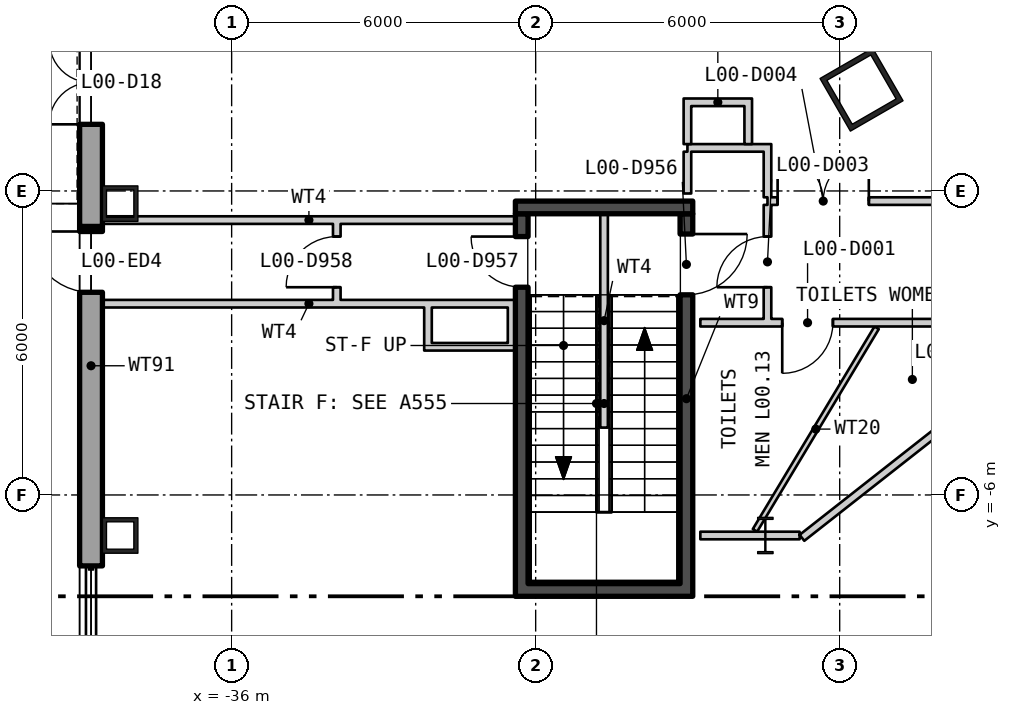
"""IFC4 building model, lengths in metres.
Left out: names, types, materials, properties, quantities, classifications, styles, units other than length and angle.
Written with IfcOpenShell. Run it as: python <this file> out.ifc"""

import sys

from ifc_helpers import new_model, si_unit, direction, frame, frame_2d, origin, origin_2d, place, context, subcontext, project, spatial, polyline, rectangle, hollow_rectangle, i_section, outline, extrude, element, fill, save


model = new_model("IFC4")
c1 = context("Model", 3, precision=1e-05, world=origin(), true_north=direction((0.0, 1.0)))
c2 = subcontext(c1, "Body", "Model", "MODEL_VIEW")
j1 = project(units=[si_unit("LENGTHUNIT", "METRE"), si_unit("PLANEANGLEUNIT", "RADIAN")], contexts=[c1])
p1 = place(None, origin())
s1 = spatial("IfcSite", under=j1, at=p1, CompositionType="ELEMENT")
p2 = place(p1, origin())
s2 = spatial("IfcBuilding", under=s1, at=p2, CompositionType="ELEMENT")
p3 = place(p2, origin())
s3 = spatial("IfcBuildingStorey", under=s2, at=p3, CompositionType="ELEMENT", Elevation=0.0)
p4 = place(p3, frame((-23.569, 2.0, 0.0), z_axis=(0.0, 0.0, 1.0), x_axis=(0.5, -0.866025403784, 0.0)))
e1 = element("IfcColumn", 1, at=p4, inside=s3, PredefinedType="COLUMN", context=c2, shape_type="SweptSolid", body=[
    extrude(hollow_rectangle(XDim=1.2, YDim=1.2, WallThickness=0.1, at=origin_2d()), origin(), (0.0, 0.0, 1.0), 8.4),
])
for number, where, z_axis, x_axis in (
    (2, (-38.2, -0.25, 0.0), (0.0, 0.0, 1.0), (0.0, -1.0, 0.0)),
    (3, (-38.2, -6.8, 0.0), (0.0, 0.0, 1.0), (0.0, -1.0, 0.0)),
):
    element("IfcColumn", number, at=place(p3, frame(where, z_axis=z_axis, x_axis=x_axis)), inside=s3, PredefinedType="COLUMN", context=c2, shape_type="SweptSolid", body=[
        extrude(hollow_rectangle(XDim=0.7, YDim=0.7, WallThickness=0.08, at=origin_2d()), origin(), (0.0, 0.0, 1.0), 8.4),
    ])
p5 = place(p3, frame((-25.467, -6.8, 0.0), z_axis=(0.0, 0.0, 1.0), x_axis=(1.0, 0.0, 0.0)))
e4 = element("IfcColumn", 4, at=p5, inside=s3, PredefinedType="COLUMN", context=c2, shape_type="SweptSolid", body=[
    extrude(i_section(OverallWidth=0.304, OverallDepth=0.716, WebThickness=0.021, FlangeThickness=0.04, at=origin_2d()), origin(), (0.0, 0.0, 1.0), 8.4),
])
p6 = place(p3, frame((-38.775, 19.975, 5.4), z_axis=(0.0, 0.0, 1.0), x_axis=(0.0, -1.0, 0.0)))
e5 = element("IfcWall", 5, at=p6, inside=s3, PredefinedType="SOLIDWALL", context=c2, shape_type="SweptSolid", body=[
    extrude(outline(polyline([(-0.225, -0.225), (53.775, -0.225), (53.325, 0.225), (0.225, 0.225), (-0.225, -0.225)])), origin(), (0.0, 0.0, 1.0), 2.6),
])
p7 = place(p3, frame((-38.775, 0.35, -0.4), z_axis=(0.0, 0.0, 1.0), x_axis=(0.0, -1.0, 0.0)))
e6 = element("IfcWall", 6, at=p7, inside=s3, PredefinedType="SOLIDWALL", context=c2, shape_type="SweptSolid", body=[
    extrude(outline(polyline([(0.0, -0.225), (1.05, -0.225), (1.05, 0.225), (0.0, 0.225), (0.0, -0.225)])), origin(), (0.0, 0.0, 1.0), 5.51),
])
p8 = place(p3, frame((-38.775, -6.2, -0.4), z_axis=(0.0, 0.0, 1.0), x_axis=(0.0, -1.0, 0.0)))
e7 = element("IfcWall", 7, at=p8, inside=s3, PredefinedType="SOLIDWALL", context=c2, shape_type="SweptSolid", body=[
    extrude(outline(polyline([(0.0, -0.225), (1.2, -0.225), (1.2, 0.225), (0.0, 0.225), (0.0, -0.225)])), origin(), (0.0, 0.0, 1.0), 5.8),
])
p9 = place(p3, frame((-38.775, 5.7, -0.4), z_axis=(0.0, 0.0, 1.0), x_axis=(0.0, -1.0, 0.0)))
e8 = element("IfcWall", 8, at=p9, inside=s3, PredefinedType="SOLIDWALL", context=c2, shape_type="SweptSolid", body=[
    extrude(outline(polyline([(0.0, -0.225), (5.35, -0.225), (5.35, 0.225), (0.0, 0.225), (0.0, -0.225)])), origin(), (0.0, 0.0, 1.0), 5.8),
])
p10 = place(p9, frame((0.965, 0.0, 0.4)))
e9 = element("IfcOpeningElement", 9, at=p10, cuts=e8, PredefinedType="OPENING", context=c2, shape_type="SweptSolid", body=[
    extrude(rectangle(XDim=1.65, YDim=3.0, at=frame_2d((0.825, 1.5))), frame((0.0, 0.235, 0.0), z_axis=(0.0, -1.0, 0.0), x_axis=(1.0, 0.0, 0.0)), (0.0, 0.0, 1.0), 0.47),
])
p11 = place(p9, frame((2.735, 0.0, 0.4)))
e10 = element("IfcOpeningElement", 10, at=p11, cuts=e8, PredefinedType="OPENING", context=c2, shape_type="SweptSolid", body=[
    extrude(rectangle(XDim=1.65, YDim=3.0, at=frame_2d((0.825, 1.5))), frame((0.0, 0.235, 0.0), z_axis=(0.0, -1.0, 0.0), x_axis=(1.0, 0.0, 0.0)), (0.0, 0.0, 1.0), 0.47),
])
p12 = place(p3, frame((-38.775, -0.7, -0.4), z_axis=(0.0, 0.0, 1.0), x_axis=(0.0, -1.0, 0.0)))
e11 = element("IfcWall", 11, at=p12, inside=s3, PredefinedType="SOLIDWALL", context=c2, shape_type="SweptSolid", body=[
    extrude(outline(polyline([(0.0, -0.225), (5.5, -0.225), (5.5, 0.225), (0.0, 0.225), (0.0, -0.225)])), origin(), (0.0, 0.0, 1.0), 5.8),
])
p13 = place(p12, frame((0.1, 0.0, 0.4)))
e12 = element("IfcOpeningElement", 12, at=p13, cuts=e11, PredefinedType="OPENING", context=c2, shape_type="SweptSolid", body=[
    extrude(rectangle(XDim=1.2, YDim=2.4, at=frame_2d((0.6, 1.2))), frame((0.0, 0.235, 0.0), z_axis=(0.0, -1.0, 0.0), x_axis=(1.0, 0.0, 0.0)), (0.0, 0.0, 1.0), 0.47),
])
p14 = place(p3, frame((-38.775, -7.4, -0.4), z_axis=(0.0, 0.0, 1.0), x_axis=(0.0, -1.0, 0.0)))
e13 = element("IfcWall", 13, at=p14, inside=s3, PredefinedType="SOLIDWALL", context=c2, shape_type="SweptSolid", body=[
    extrude(outline(polyline([(0.0, -0.225), (5.35, -0.225), (5.35, 0.225), (0.0, 0.225), (0.0, -0.225)])), origin(), (0.0, 0.0, 1.0), 1.0),
])
p15 = place(p3, frame((-30.275, -7.75, 0.0), z_axis=(0.0, 0.0, 1.0), x_axis=(0.0, 1.0, 0.0)))
e14 = element("IfcWall", 14, at=p15, inside=s3, PredefinedType="SHEAR", context=c2, shape_type="SweptSolid", body=[
    extrude(rectangle(XDim=7.3, YDim=0.25, at=frame_2d((3.65, 0.0))), origin(), (0.0, 0.0, 1.0), 8.18),
])
p16 = place(p15, frame((5.85, 0.0, 0.0)))
e15 = element("IfcOpeningElement", 15, at=p16, cuts=e14, PredefinedType="OPENING", context=c2, shape_type="SweptSolid", body=[
    extrude(rectangle(XDim=1.0, YDim=2.1, at=frame_2d((0.5, 1.05))), frame((0.0, 0.135, 0.0), z_axis=(0.0, -1.0, 0.0), x_axis=(1.0, 0.0, 0.0)), (0.0, 0.0, 1.0), 0.27),
])
p17 = place(p3, frame((-27.025, -7.75, 0.0), z_axis=(0.0, 0.0, 1.0), x_axis=(0.0, 1.0, 0.0)))
e16 = element("IfcWall", 16, at=p17, inside=s3, PredefinedType="SHEAR", context=c2, shape_type="SweptSolid", body=[
    extrude(rectangle(XDim=7.3, YDim=0.25, at=frame_2d((3.65, 0.0))), origin(), (0.0, 0.0, 1.0), 8.18),
])
p18 = place(p17, frame((5.7, 0.0, 0.0)))
e17 = element("IfcOpeningElement", 17, at=p18, cuts=e16, PredefinedType="OPENING", context=c2, shape_type="SweptSolid", body=[
    extrude(rectangle(XDim=1.2, YDim=2.1, at=frame_2d((0.6, 1.05))), frame((0.0, 0.135, 0.0), z_axis=(0.0, -1.0, 0.0), x_axis=(1.0, 0.0, 0.0)), (0.0, 0.0, 1.0), 0.27),
])
for number, where, z_axis, x_axis in (
    (18, (-30.4, -7.875, 0.0), (0.0, 0.0, 1.0), (1.0, 0.0, 0.0)),
    (19, (-30.4, -0.325, 0.0), (0.0, 0.0, 1.0), (1.0, 0.0, 0.0)),
):
    element("IfcWall", number, at=place(p3, frame(where, z_axis=z_axis, x_axis=x_axis)), inside=s3, PredefinedType="SHEAR", context=c2, shape_type="SweptSolid", body=[
        extrude(rectangle(XDim=3.5, YDim=0.25, at=frame_2d((1.75, 0.0))), origin(), (0.0, 0.0, 1.0), 8.18),
    ])
p19 = place(p3, frame((-28.65, -4.67, 0.0), z_axis=(0.0, 0.0, 1.0), x_axis=(0.0, 1.0, 0.0)))
e20 = element("IfcWall", 20, at=p19, inside=s3, PredefinedType="PARTITIONING", context=c2, shape_type="SweptSolid", body=[
    extrude(rectangle(XDim=4.22, YDim=0.15, at=frame_2d((2.11, 0.0))), origin(), (0.0, 0.0, 1.0), 4.0),
])
for number, where, z_axis, x_axis in (
    (21, (-38.55, -2.225, 0.0), (0.0, 0.0, 1.0), (1.0, 0.0, 0.0)),
    (22, (-38.55, -0.575, 0.0), (0.0, 0.0, 1.0), (1.0, 0.0, 0.0)),
):
    element("IfcWall", number, at=place(p3, frame(where, z_axis=z_axis, x_axis=x_axis)), inside=s3, PredefinedType="PARTITIONING", context=c2, shape_type="SweptSolid", body=[
        extrude(rectangle(XDim=8.15, YDim=0.15, at=frame_2d((4.075, 0.0))), origin(), (0.0, 0.0, 1.0), 8.18),
    ])
p20 = place(p3, frame((-33.925, -2.15, 0.0), z_axis=(0.0, 0.0, 1.0), x_axis=(0.0, 1.0, 0.0)))
e23 = element("IfcWall", 23, at=p20, inside=s3, PredefinedType="PARTITIONING", context=c2, shape_type="SweptSolid", body=[
    extrude(rectangle(XDim=1.5, YDim=0.15, at=frame_2d((0.75, 0.0))), origin(), (0.0, 0.0, 1.0), 8.18),
])
p21 = place(p20, frame((0.25, 0.0, 0.0)))
e24 = element("IfcOpeningElement", 24, at=p21, cuts=e23, PredefinedType="OPENING", context=c2, shape_type="SweptSolid", body=[
    extrude(rectangle(XDim=1.0, YDim=2.1, at=frame_2d((0.5, 1.05))), frame((0.0, 0.085, 0.0), z_axis=(0.0, -1.0, 0.0), x_axis=(1.0, 0.0, 0.0)), (0.0, 0.0, 1.0), 0.17),
])
p22 = place(p3, frame((-32.2, -3.075, 0.0), z_axis=(0.0, 0.0, 1.0), x_axis=(1.0, 0.0, 0.0)))
e25 = element("IfcWall", 25, at=p22, inside=s3, PredefinedType="PARTITIONING", context=c2, shape_type="SweptSolid", body=[
    extrude(rectangle(XDim=1.8, YDim=0.15, at=frame_2d((0.9, 0.0))), origin(), (0.0, 0.0, 1.0), 8.18),
])
for number, where, z_axis, x_axis in (
    (26, (-32.125, -3.0, 0.0), (0.0, 0.0, 1.0), (0.0, 1.0, 0.0)),
    (27, (-30.475, -3.0, 0.0), (0.0, 0.0, 1.0), (0.0, 1.0, 0.0)),
):
    element("IfcWall", number, at=place(p3, frame(where, z_axis=z_axis, x_axis=x_axis)), inside=s3, PredefinedType="PARTITIONING", context=c2, shape_type="SweptSolid", body=[
        extrude(rectangle(XDim=0.7, YDim=0.15, at=frame_2d((0.35, 0.0))), origin(), (0.0, 0.0, 1.0), 8.18),
    ])
p23 = place(p3, frame((-27.08, 1.75, 0.0), z_axis=(0.0, 0.0, 1.0), x_axis=(1.0, 0.0, 0.0)))
e28 = element("IfcWall", 28, at=p23, inside=s3, PredefinedType="PARTITIONING", context=c2, shape_type="SweptSolid", body=[
    extrude(rectangle(XDim=1.35, YDim=0.15, at=frame_2d((0.675, 0.0))), origin(), (0.0, 0.0, 1.0), 8.18),
])
p24 = place(p3, frame((-27.005, -0.05, 0.0), z_axis=(0.0, 0.0, 1.0), x_axis=(0.0, 1.0, 0.0)))
e29 = element("IfcWall", 29, at=p24, inside=s3, PredefinedType="PARTITIONING", context=c2, shape_type="SweptSolid", body=[
    extrude(rectangle(XDim=0.825, YDim=0.15, at=frame_2d((0.412, 0.0))), origin(), (0.0, 0.0, 1.0), 8.18),
])
p25 = place(p3, frame((-27.005, 0.85, 0.0), z_axis=(0.0, 0.0, 1.0), x_axis=(1.0, 0.0, 0.0)))
e30 = element("IfcWall", 30, at=p25, inside=s3, PredefinedType="PARTITIONING", context=c2, shape_type="SweptSolid", body=[
    extrude(rectangle(XDim=1.275, YDim=0.15, at=frame_2d((0.637, 0.0))), origin(), (0.0, 0.0, 1.0), 8.18),
])
p26 = place(p3, frame((-27.005, 0.925, 0.0), z_axis=(0.0, 0.0, 1.0), x_axis=(0.0, 1.0, 0.0)))
e31 = element("IfcWall", 31, at=p26, inside=s3, PredefinedType="PARTITIONING", context=c2, shape_type="SweptSolid", body=[
    extrude(rectangle(XDim=0.75, YDim=0.15, at=frame_2d((0.375, 0.0))), origin(), (0.0, 0.0, 1.0), 8.18),
])
p27 = place(p3, frame((-26.75, -6.8, 0.0), z_axis=(0.0, 0.0, 1.0), x_axis=(1.0, 0.0, 0.0)))
e32 = element("IfcWall", 32, at=p27, inside=s3, PredefinedType="PARTITIONING", context=c2, shape_type="SweptSolid", body=[
    extrude(rectangle(XDim=1.959, YDim=0.15, at=frame_2d((0.98, 0.0))), origin(), (0.0, 0.0, 1.0), 7.39),
])
p28 = place(p3, frame((-26.75, -2.6, 0.0), z_axis=(0.0, 0.0, 1.0), x_axis=(1.0, 0.0, 0.0)))
e33 = element("IfcWall", 33, at=p28, inside=s3, PredefinedType="PARTITIONING", context=c2, shape_type="SweptSolid", body=[
    extrude(rectangle(XDim=6.85, YDim=0.15, at=frame_2d((3.425, 0.0))), origin(), (0.0, 0.0, 1.0), 8.18),
])
p29 = place(p28, frame((1.616, 0.0, 0.0)))
e34 = element("IfcOpeningElement", 34, at=p29, cuts=e33, PredefinedType="OPENING", context=c2, shape_type="SweptSolid", body=[
    extrude(rectangle(XDim=1.0, YDim=2.1, at=frame_2d((0.5, 1.05))), frame((0.0, 0.085, 0.0), z_axis=(0.0, -1.0, 0.0), x_axis=(1.0, 0.0, 0.0)), (0.0, 0.0, 1.0), 0.17),
])
p30 = place(p28, frame((4.645, 0.0, 0.0)))
e35 = element("IfcOpeningElement", 35, at=p30, cuts=e33, PredefinedType="OPENING", context=c2, shape_type="SweptSolid", body=[
    extrude(rectangle(XDim=1.0, YDim=2.1, at=frame_2d((0.5, 1.05))), frame((0.0, 0.085, 0.0), z_axis=(0.0, -1.0, 0.0), x_axis=(1.0, 0.0, 0.0)), (0.0, 0.0, 1.0), 0.17),
])
p31 = place(p3, frame((-25.805, 0.925, 0.0), z_axis=(0.0, 0.0, 1.0), x_axis=(0.0, 1.0, 0.0)))
e36 = element("IfcWall", 36, at=p31, inside=s3, PredefinedType="PARTITIONING", context=c2, shape_type="SweptSolid", body=[
    extrude(rectangle(XDim=0.75, YDim=0.15, at=frame_2d((0.375, 0.0))), origin(), (0.0, 0.0, 1.0), 8.18),
])
p32 = place(p3, frame((-25.73, 0.85, 0.0), z_axis=(0.0, 0.0, 1.0), x_axis=(1.0, 0.0, 0.0)))
e37 = element("IfcWall", 37, at=p32, inside=s3, PredefinedType="PARTITIONING", context=c2, shape_type="SweptSolid", body=[
    extrude(rectangle(XDim=0.23, YDim=0.15, at=frame_2d((0.115, 0.0))), origin(), (0.0, 0.0, 1.0), 8.18),
])
p33 = place(p3, frame((-25.672, -6.699, 0.0), z_axis=(0.0, 0.0, 1.0), x_axis=(0.5148425828, 0.857284733875, 0.0)))
e38 = element("IfcWall", 38, at=p33, inside=s3, PredefinedType="PARTITIONING", context=c2, shape_type="SweptSolid", body=[
    extrude(rectangle(XDim=4.664, YDim=0.1, at=frame_2d((2.332, 0.0))), origin(), (0.0, 0.0, 1.0), 8.18),
])
p34 = place(p3, frame((-25.425, -2.525, 0.0), z_axis=(0.0, 0.0, 1.0), x_axis=(0.0, 1.0, 0.0)))
e39 = element("IfcWall", 39, at=p34, inside=s3, PredefinedType="PARTITIONING", context=c2, shape_type="SweptSolid", body=[
    extrude(rectangle(XDim=2.25, YDim=0.15, at=frame_2d((1.125, 0.0))), origin(), (0.0, 0.0, 1.0), 7.49),
])
p35 = place(p34, frame((0.625, 0.0, 0.0)))
e40 = element("IfcOpeningElement", 40, at=p35, cuts=e39, PredefinedType="OPENING", context=c2, shape_type="SweptSolid", body=[
    extrude(rectangle(XDim=1.0, YDim=2.1, at=frame_2d((0.5, 1.05))), frame((0.0, 0.085, 0.0), z_axis=(0.0, -1.0, 0.0), x_axis=(1.0, 0.0, 0.0)), (0.0, 0.0, 1.0), 0.17),
])
p36 = place(p3, frame((-25.425, -0.2, 0.0), z_axis=(0.0, 0.0, 1.0), x_axis=(1.0, 0.0, 0.0)))
e41 = element("IfcWall", 41, at=p36, inside=s3, PredefinedType="PARTITIONING", context=c2, shape_type="SweptSolid", body=[
    extrude(rectangle(XDim=5.522, YDim=0.15, at=frame_2d((2.761, 0.0))), origin(), (0.0, 0.0, 1.0), 8.18),
])
p37 = place(p36, frame((0.2, 0.0, 0.0)))
e42 = element("IfcOpeningElement", 42, at=p37, cuts=e41, PredefinedType="OPENING", context=c2, shape_type="SweptSolid", body=[
    extrude(rectangle(XDim=1.8, YDim=2.1, at=frame_2d((0.9, 1.05))), frame((0.0, 0.085, 0.0), z_axis=(0.0, -1.0, 0.0), x_axis=(1.0, 0.0, 0.0)), (0.0, 0.0, 1.0), 0.17),
])
p38 = place(p3, frame((-25.425, -0.125, 0.0), z_axis=(0.0, 0.0, 1.0), x_axis=(0.0, 1.0, 0.0)))
e43 = element("IfcWall", 43, at=p38, inside=s3, PredefinedType="PARTITIONING", context=c2, shape_type="SweptSolid", body=[
    extrude(rectangle(XDim=1.05, YDim=0.15, at=frame_2d((0.525, 0.0))), origin(), (0.0, 0.0, 1.0), 7.49),
])
p39 = place(p3, frame((-25.392, 6.592, 0.0), z_axis=(0.0, 0.0, 1.0), x_axis=(0.707106781187, -0.707106781187, 0.0)))
e44 = element("IfcWall", 44, at=p39, inside=s3, PredefinedType="PARTITIONING", context=c2, shape_type="SweptSolid", body=[
    extrude(rectangle(XDim=7.586, YDim=0.15, at=frame_2d((3.793, 0.0))), origin(), (0.0, 0.0, 1.0), 8.18),
])
p40 = place(p3, frame((-24.745, -6.846, 0.0), z_axis=(0.0, 0.0, 1.0), x_axis=(0.786333607762, 0.617802118242, 0.0)))
e45 = element("IfcWall", 45, at=p40, inside=s3, PredefinedType="PARTITIONING", context=c2, shape_type="SweptSolid", body=[
    extrude(rectangle(XDim=4.545, YDim=0.15, at=frame_2d((2.273, 0.0))), origin(), (0.0, 0.0, 1.0), 8.18),
])
p41 = place(p11, frame((1.65, 0.0, 0.0), z_axis=(0.0, 0.0, 1.0), x_axis=(-1.0, 0.0, 0.0)))
e46 = element("IfcDoor", 46, at=p41, inside=s3, OperationType="DOUBLE_DOOR_DOUBLE_SWING", PredefinedType="DOOR", context=c2, shape_type="SweptSolid", body=[
    extrude(rectangle(XDim=1.65, YDim=3.0, at=frame_2d((0.825, 1.5))), frame((0.0, 0.025, 0.0), z_axis=(0.0, -1.0, 0.0), x_axis=(1.0, 0.0, 0.0)), (0.0, 0.0, 1.0), 0.05),
])
fill(e10, e46)
p42 = place(p13, frame((1.2, 0.0, 0.0), z_axis=(0.0, 0.0, 1.0), x_axis=(-1.0, 0.0, 0.0)))
e47 = element("IfcDoor", 47, at=p42, inside=s3, OperationType="SINGLE_SWING_LEFT", PredefinedType="DOOR", context=c2, shape_type="SweptSolid", body=[
    extrude(rectangle(XDim=1.2, YDim=2.4, at=frame_2d((0.6, 1.2))), frame((0.0, 0.025, 0.0), z_axis=(0.0, -1.0, 0.0), x_axis=(1.0, 0.0, 0.0)), (0.0, 0.0, 1.0), 0.05),
])
fill(e12, e47)
p43 = place(p18, origin())
e48 = element("IfcDoor", 48, at=p43, inside=s3, OperationType="SINGLE_SWING_RIGHT", PredefinedType="DOOR", context=c2, shape_type="SweptSolid", body=[
    extrude(rectangle(XDim=1.2, YDim=2.1, at=frame_2d((0.6, 1.05))), frame((0.0, 0.025, 0.0), z_axis=(0.0, -1.0, 0.0), x_axis=(1.0, 0.0, 0.0)), (0.0, 0.0, 1.0), 0.05),
])
fill(e17, e48)
p44 = place(p16, origin())
e49 = element("IfcDoor", 49, at=p44, inside=s3, OperationType="SINGLE_SWING_LEFT", PredefinedType="DOOR", context=c2, shape_type="SweptSolid", body=[
    extrude(rectangle(XDim=1.0, YDim=2.1, at=frame_2d((0.5, 1.05))), frame((0.0, 0.025, 0.0), z_axis=(0.0, -1.0, 0.0), x_axis=(1.0, 0.0, 0.0)), (0.0, 0.0, 1.0), 0.05),
])
fill(e15, e49)
p45 = place(p21, origin())
e50 = element("IfcDoor", 50, at=p45, inside=s3, OperationType="SINGLE_SWING_RIGHT", PredefinedType="DOOR", context=c2, shape_type="SweptSolid", body=[
    extrude(rectangle(XDim=1.0, YDim=2.1, at=frame_2d((0.5, 1.05))), frame((0.0, 0.025, 0.0), z_axis=(0.0, -1.0, 0.0), x_axis=(1.0, 0.0, 0.0)), (0.0, 0.0, 1.0), 0.05),
])
fill(e24, e50)
p46 = place(p29, origin())
e51 = element("IfcDoor", 51, at=p46, inside=s3, OperationType="SINGLE_SWING_LEFT", PredefinedType="DOOR", context=c2, shape_type="SweptSolid", body=[
    extrude(rectangle(XDim=1.0, YDim=2.1, at=frame_2d((0.5, 1.05))), frame((0.0, 0.025, 0.0), z_axis=(0.0, -1.0, 0.0), x_axis=(1.0, 0.0, 0.0)), (0.0, 0.0, 1.0), 0.05),
])
fill(e34, e51)
p47 = place(p35, origin())
e52 = element("IfcDoor", 52, at=p47, inside=s3, OperationType="SINGLE_SWING_RIGHT", PredefinedType="DOOR", context=c2, shape_type="SweptSolid", body=[
    extrude(rectangle(XDim=1.0, YDim=2.1, at=frame_2d((0.5, 1.05))), frame((0.0, 0.025, 0.0), z_axis=(0.0, -1.0, 0.0), x_axis=(1.0, 0.0, 0.0)), (0.0, 0.0, 1.0), 0.05),
])
fill(e40, e52)
p48 = place(p37, origin())
e53 = element("IfcDoor", 53, at=p48, inside=s3, OperationType="DOUBLE_DOOR_SINGLE_SWING", PredefinedType="DOOR", context=c2, shape_type="SweptSolid", body=[
    extrude(rectangle(XDim=1.8, YDim=2.1, at=frame_2d((0.9, 1.05))), frame((0.0, 0.025, 0.0), z_axis=(0.0, -1.0, 0.0), x_axis=(1.0, 0.0, 0.0)), (0.0, 0.0, 1.0), 0.05),
])
fill(e42, e53)
save(model, sys.argv[1])
